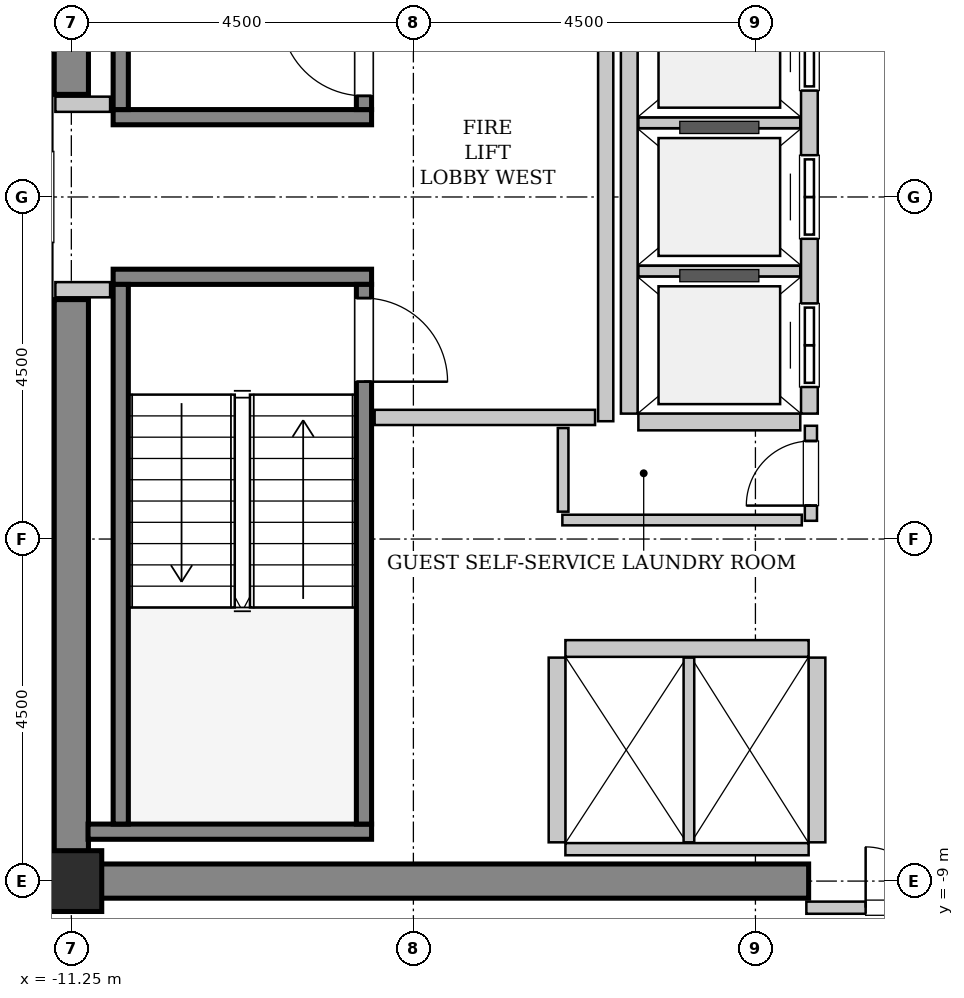
"""IFC4 building model, lengths in metres.
Left out: names, types, materials, properties, quantities, classifications, styles, units other than length and angle.
Written with IfcOpenShell. Run it as: python <this file> out.ifc"""

import sys

from ifc_helpers import new_model, si_unit, direction, frame, frame_2d, origin, origin_2d, place, context, subcontext, project, spatial, rectangle, hollow_rectangle, extrude, source, transform, mapped, element, fill, save


model = new_model("IFC4")
c1 = context("Model", 3, precision=1e-05, world=origin(), true_north=direction((0.0, 1.0)))
c2 = subcontext(c1, "Body", "Model", "MODEL_VIEW")
j1 = project(units=[si_unit("LENGTHUNIT", "METRE"), si_unit("PLANEANGLEUNIT", "RADIAN")], contexts=[c1])
p1 = place(None, origin())
s1 = spatial("IfcSite", under=j1, at=p1, CompositionType="ELEMENT")
p2 = place(p1, origin())
s2 = spatial("IfcBuilding", under=s1, at=p2, CompositionType="ELEMENT")
p3 = place(p2, frame((0.0, 0.0, 264.6)))
s3 = spatial("IfcBuildingStorey", under=s2, at=p3, CompositionType="ELEMENT", Elevation=264.6)
m1 = source(origin(), c2, "Body", "SweptSolid", [
    extrude(rectangle(XDim=9.925, YDim=0.45, at=frame_2d((4.962, 0.0))), origin(), (0.0, 0.0, 1.0), 3.8),
])
p4 = place(p3, frame((-11.475, -9.0, 0.0), z_axis=(0.0, 0.0, 1.0), x_axis=(1.0, 0.0, 0.0)))
e1 = element("IfcWall", 1, at=p4, inside=s3, PredefinedType="SHEAR", context=c2, shape_type="MappedRepresentation", body=[
    mapped(m1, transform((0.0, 0.0, 0.0), x_axis=(1.0, 0.0, 0.0), y_axis=(0.0, 1.0, 0.0), z_axis=(0.0, 0.0, 1.0), scale=1.0)),
])
m2 = source(origin(), c2, "Body", "SweptSolid", [
    extrude(rectangle(XDim=7.425, YDim=0.45, at=frame_2d((3.712, 0.0))), origin(), (0.0, 0.0, 1.0), 3.8),
])
for number, where, z_axis, x_axis in (
    (2, (-11.25, -8.775, 0.0), (0.0, 0.0, 1.0), (0.0, 1.0, 0.0)),
    (3, (-11.25, 1.35, 0.0), (0.0, 0.0, 1.0), (0.0, 1.0, 0.0)),
):
    element("IfcWall", number, at=place(p3, frame(where, z_axis=z_axis, x_axis=x_axis)), inside=s3, PredefinedType="SHEAR", context=c2, shape_type="MappedRepresentation", body=[
        mapped(m2, transform((0.0, 0.0, 0.0), x_axis=(1.0, 0.0, 0.0), y_axis=(0.0, 1.0, 0.0), z_axis=(0.0, 0.0, 1.0), scale=1.0)),
    ])
m3 = source(origin(), c2, "Body", "SweptSolid", [
    extrude(hollow_rectangle(XDim=0.8, YDim=0.8, WallThickness=0.04, InnerFilletRadius=0.04, OuterFilletRadius=0.08, at=origin_2d()), origin(), (0.0, 0.0, 1.0), 3.8),
])
p5 = place(p3, frame((-11.25, -9.0, 0.0), z_axis=(0.0, 0.0, 1.0), x_axis=(1.0, 0.0, 0.0)))
e4 = element("IfcColumn", 4, at=p5, inside=s3, PredefinedType="COLUMN", context=c2, shape_type="MappedRepresentation", body=[
    mapped(m3, transform((0.0, 0.0, 0.0), x_axis=(1.0, 0.0, 0.0), y_axis=(0.0, 1.0, 0.0), z_axis=(0.0, 0.0, 1.0), scale=1.0)),
])
m4 = source(origin(), c2, "Body", "SweptSolid", [
    extrude(rectangle(XDim=3.4, YDim=0.2, at=frame_2d((1.7, 0.0))), origin(), (0.0, 0.0, 1.0), 3.8),
])
p6 = place(p3, frame((-7.3, 1.05, 0.0), z_axis=(0.0, 0.0, 1.0), x_axis=(-1.0, 0.0, 0.0)))
e5 = element("IfcWall", 5, at=p6, inside=s3, PredefinedType="SOLIDWALL", context=c2, shape_type="MappedRepresentation", body=[
    mapped(m4, transform((0.0, 0.0, 0.0), x_axis=(1.0, 0.0, 0.0), y_axis=(0.0, 1.0, 0.0), z_axis=(0.0, 0.0, 1.0), scale=1.0)),
])
m5 = source(origin(), c2, "Body", "SweptSolid", [
    extrude(rectangle(XDim=7.1, YDim=0.2, at=frame_2d((3.55, 0.0))), origin(), (0.0, 0.0, 1.0), 3.8),
])
p7 = place(p3, frame((-7.4, 1.15, 0.0), z_axis=(0.0, 0.0, 1.0), x_axis=(0.0, 1.0, 0.0)))
e6 = element("IfcWall", 6, at=p7, inside=s3, PredefinedType="SOLIDWALL", context=c2, shape_type="MappedRepresentation", body=[
    mapped(m5, transform((0.0, 0.0, 0.0), x_axis=(1.0, 0.0, 0.0), y_axis=(0.0, 1.0, 0.0), z_axis=(0.0, 0.0, 1.0), scale=1.0)),
])
p8 = place(p7, frame((0.18, 0.0, 0.0)))
e7 = element("IfcOpeningElement", 7, at=p8, cuts=e6, PredefinedType="OPENING", context=c2, shape_type="SweptSolid", body=[
    extrude(rectangle(XDim=1.1, YDim=2.15, at=frame_2d((0.55, 1.075))), frame((0.0, 0.11, 0.0), z_axis=(0.0, -1.0, 0.0), x_axis=(1.0, 0.0, 0.0)), (0.0, 0.0, 1.0), 0.22),
])
p9 = place(p3, frame((-10.6, 1.15, 0.0), z_axis=(0.0, 0.0, 1.0), x_axis=(0.0, 1.0, 0.0)))
e8 = element("IfcWall", 8, at=p9, inside=s3, PredefinedType="SOLIDWALL", context=c2, shape_type="MappedRepresentation", body=[
    mapped(m5, transform((0.0, 0.0, 0.0), x_axis=(1.0, 0.0, 0.0), y_axis=(0.0, 1.0, 0.0), z_axis=(0.0, 0.0, 1.0), scale=1.0)),
])
p10 = place(p3, frame((-10.7, -1.05, 0.0), z_axis=(0.0, 0.0, 1.0), x_axis=(1.0, 0.0, 0.0)))
e9 = element("IfcWall", 9, at=p10, inside=s3, PredefinedType="SOLIDWALL", context=c2, shape_type="MappedRepresentation", body=[
    mapped(m4, transform((0.0, 0.0, 0.0), x_axis=(1.0, 0.0, 0.0), y_axis=(0.0, 1.0, 0.0), z_axis=(0.0, 0.0, 1.0), scale=1.0)),
])
m6 = source(origin(), c2, "Body", "SweptSolid", [
    extrude(rectangle(XDim=3.73, YDim=0.2, at=frame_2d((1.865, 0.0))), origin(), (0.0, 0.0, 1.0), 3.8),
])
p11 = place(p3, frame((-11.03, -8.35, 0.0), z_axis=(0.0, 0.0, 1.0), x_axis=(1.0, 0.0, 0.0)))
e10 = element("IfcWall", 10, at=p11, inside=s3, PredefinedType="SOLIDWALL", context=c2, shape_type="MappedRepresentation", body=[
    mapped(m6, transform((0.0, 0.0, 0.0), x_axis=(1.0, 0.0, 0.0), y_axis=(0.0, 1.0, 0.0), z_axis=(0.0, 0.0, 1.0), scale=1.0)),
])
p12 = place(p3, frame((-10.6, -1.15, 0.0), z_axis=(0.0, 0.0, 1.0), x_axis=(0.0, -1.0, 0.0)))
e11 = element("IfcWall", 11, at=p12, inside=s3, PredefinedType="SOLIDWALL", context=c2, shape_type="MappedRepresentation", body=[
    mapped(m5, transform((0.0, 0.0, 0.0), x_axis=(1.0, 0.0, 0.0), y_axis=(0.0, 1.0, 0.0), z_axis=(0.0, 0.0, 1.0), scale=1.0)),
])
p13 = place(p3, frame((-7.4, -1.15, 0.0), z_axis=(0.0, 0.0, 1.0), x_axis=(0.0, -1.0, 0.0)))
e12 = element("IfcWall", 12, at=p13, inside=s3, PredefinedType="SOLIDWALL", context=c2, shape_type="MappedRepresentation", body=[
    mapped(m5, transform((0.0, 0.0, 0.0), x_axis=(1.0, 0.0, 0.0), y_axis=(0.0, 1.0, 0.0), z_axis=(0.0, 0.0, 1.0), scale=1.0)),
])
p14 = place(p13, frame((0.18, 0.0, 0.0)))
e13 = element("IfcOpeningElement", 13, at=p14, cuts=e12, PredefinedType="OPENING", context=c2, shape_type="SweptSolid", body=[
    extrude(rectangle(XDim=1.1, YDim=2.15, at=frame_2d((0.55, 1.075))), frame((0.0, 0.11, 0.0), z_axis=(0.0, -1.0, 0.0), x_axis=(1.0, 0.0, 0.0)), (0.0, 0.0, 1.0), 0.22),
])
m7 = source(origin(), c2, "Body", "SweptSolid", [
    extrude(rectangle(XDim=3.2, YDim=0.22, at=frame_2d((1.6, 0.0))), origin(), (0.0, 0.0, 1.0), 3.535),
])
p15 = place(p3, frame((-1.55, -5.94, 0.0), z_axis=(0.0, 0.0, 1.0), x_axis=(-1.0, 0.0, 0.0)))
e14 = element("IfcWall", 14, at=p15, inside=s3, PredefinedType="SOLIDWALL", context=c2, shape_type="MappedRepresentation", body=[
    mapped(m7, transform((0.0, 0.0, 0.0), x_axis=(1.0, 0.0, 0.0), y_axis=(0.0, 1.0, 0.0), z_axis=(0.0, 0.0, 1.0), scale=1.0)),
])
m8 = source(origin(), c2, "Body", "SweptSolid", [
    extrude(rectangle(XDim=3.2, YDim=0.16, at=frame_2d((1.6, 0.0))), origin(), (0.0, 0.0, 1.0), 2.625),
])
p16 = place(p3, frame((-4.75, -8.58, 0.0), z_axis=(0.0, 0.0, 1.0), x_axis=(1.0, 0.0, 0.0)))
e15 = element("IfcWall", 15, at=p16, inside=s3, PredefinedType="PARTITIONING", context=c2, shape_type="MappedRepresentation", body=[
    mapped(m8, transform((0.0, 0.0, 0.0), x_axis=(1.0, 0.0, 0.0), y_axis=(0.0, 1.0, 0.0), z_axis=(0.0, 0.0, 1.0), scale=1.0)),
])
m9 = source(origin(), c2, "Body", "SweptSolid", [
    extrude(rectangle(XDim=2.43, YDim=0.22, at=frame_2d((1.215, 0.0))), origin(), (0.0, 0.0, 1.0), 3.535),
])
p17 = place(p3, frame((-4.86, -6.06, 0.0), z_axis=(0.0, 0.0, 1.0), x_axis=(0.0, -1.0, 0.0)))
e16 = element("IfcWall", 16, at=p17, inside=s3, PredefinedType="SOLIDWALL", context=c2, shape_type="MappedRepresentation", body=[
    mapped(m9, transform((0.0, 0.0, 0.0), x_axis=(1.0, 0.0, 0.0), y_axis=(0.0, 1.0, 0.0), z_axis=(0.0, 0.0, 1.0), scale=1.0)),
])
m10 = source(origin(), c2, "Body", "SweptSolid", [
    extrude(rectangle(XDim=2.43, YDim=0.14, at=frame_2d((1.215, 0.0))), origin(), (0.0, 0.0, 1.0), 3.535),
])
p18 = place(p3, frame((-3.125, -8.49, 0.0), z_axis=(0.0, 0.0, 1.0), x_axis=(0.0, 1.0, 0.0)))
e17 = element("IfcWall", 17, at=p18, inside=s3, PredefinedType="PARTITIONING", context=c2, shape_type="MappedRepresentation", body=[
    mapped(m10, transform((0.0, 0.0, 0.0), x_axis=(1.0, 0.0, 0.0), y_axis=(0.0, 1.0, 0.0), z_axis=(0.0, 0.0, 1.0), scale=1.0)),
])
p19 = place(p3, frame((-1.44, -8.49, 0.0), z_axis=(0.0, 0.0, 1.0), x_axis=(0.0, 1.0, 0.0)))
e18 = element("IfcWall", 18, at=p19, inside=s3, PredefinedType="SOLIDWALL", context=c2, shape_type="MappedRepresentation", body=[
    mapped(m9, transform((0.0, 0.0, 0.0), x_axis=(1.0, 0.0, 0.0), y_axis=(0.0, 1.0, 0.0), z_axis=(0.0, 0.0, 1.0), scale=1.0)),
])
m11 = source(origin(), c2, "Body", "SweptSolid", [
    extrude(rectangle(XDim=5.7, YDim=0.22, at=frame_2d((2.85, 0.0))), origin(), (0.0, 0.0, 1.0), 3.535),
])
p20 = place(p3, frame((-1.54, -2.85, 0.0), z_axis=(0.0, 0.0, 1.0), x_axis=(0.0, 1.0, 0.0)))
e19 = element("IfcWall", 19, at=p20, inside=s3, PredefinedType="SOLIDWALL", context=c2, shape_type="MappedRepresentation", body=[
    mapped(m11, transform((0.0, 0.0, 0.0), x_axis=(1.0, 0.0, 0.0), y_axis=(0.0, 1.0, 0.0), z_axis=(0.0, 0.0, 1.0), scale=1.0)),
])
p21 = place(p20, frame((0.35, 0.0, 0.0)))
e20 = element("IfcOpeningElement", 20, at=p21, cuts=e19, PredefinedType="OPENING", context=c2, shape_type="SweptSolid", body=[
    extrude(rectangle(XDim=1.1, YDim=2.2, at=frame_2d((0.55, 1.1))), frame((0.0, 0.12, 0.0), z_axis=(0.0, -1.0, 0.0), x_axis=(1.0, 0.0, 0.0)), (0.0, 0.0, 1.0), 0.24),
])
p22 = place(p20, frame((2.3, 0.0, 0.0)))
e21 = element("IfcOpeningElement", 21, at=p22, cuts=e19, PredefinedType="OPENING", context=c2, shape_type="SweptSolid", body=[
    extrude(rectangle(XDim=1.1, YDim=2.2, at=frame_2d((0.55, 1.1))), frame((0.0, 0.12, 0.0), z_axis=(0.0, -1.0, 0.0), x_axis=(1.0, 0.0, 0.0)), (0.0, 0.0, 1.0), 0.24),
])
p23 = place(p20, frame((4.25, 0.0, 0.0)))
e22 = element("IfcOpeningElement", 22, at=p23, cuts=e19, PredefinedType="OPENING", context=c2, shape_type="SweptSolid", body=[
    extrude(rectangle(XDim=1.1, YDim=2.2, at=frame_2d((0.55, 1.1))), frame((0.0, 0.12, 0.0), z_axis=(0.0, -1.0, 0.0), x_axis=(1.0, 0.0, 0.0)), (0.0, 0.0, 1.0), 0.24),
])
p24 = place(p3, frame((-3.91, 2.85, 0.0), z_axis=(0.0, 0.0, 1.0), x_axis=(0.0, -1.0, 0.0)))
e23 = element("IfcWall", 23, at=p24, inside=s3, PredefinedType="SOLIDWALL", context=c2, shape_type="MappedRepresentation", body=[
    mapped(m11, transform((0.0, 0.0, 0.0), x_axis=(1.0, 0.0, 0.0), y_axis=(0.0, 1.0, 0.0), z_axis=(0.0, 0.0, 1.0), scale=1.0)),
])
m12 = source(origin(), c2, "Body", "SweptSolid", [
    extrude(rectangle(XDim=2.13, YDim=0.22, at=frame_2d((1.065, 0.0))), origin(), (0.0, 0.0, 1.0), 3.535),
])
p25 = place(p3, frame((-3.79, -2.96, 0.0), z_axis=(0.0, 0.0, 1.0), x_axis=(1.0, 0.0, 0.0)))
e24 = element("IfcWall", 24, at=p25, inside=s3, PredefinedType="SOLIDWALL", context=c2, shape_type="MappedRepresentation", body=[
    mapped(m12, transform((0.0, 0.0, 0.0), x_axis=(1.0, 0.0, 0.0), y_axis=(0.0, 1.0, 0.0), z_axis=(0.0, 0.0, 1.0), scale=1.0)),
])
m13 = source(origin(), c2, "Body", "SweptSolid", [
    extrude(rectangle(XDim=2.13, YDim=0.14, at=frame_2d((1.065, 0.0))), origin(), (0.0, 0.0, 1.0), 3.535),
])
for number, where, z_axis, x_axis in (
    (25, (-3.79, -0.975, 0.0), (0.0, 0.0, 1.0), (1.0, 0.0, 0.0)),
    (26, (-3.79, 0.975, 0.0), (0.0, 0.0, 1.0), (1.0, 0.0, 0.0)),
):
    element("IfcWall", number, at=place(p3, frame(where, z_axis=z_axis, x_axis=x_axis)), inside=s3, PredefinedType="PARTITIONING", context=c2, shape_type="MappedRepresentation", body=[
        mapped(m13, transform((0.0, 0.0, 0.0), x_axis=(1.0, 0.0, 0.0), y_axis=(0.0, 1.0, 0.0), z_axis=(0.0, 0.0, 1.0), scale=1.0)),
    ])
m14 = source(origin(), c2, "Body", "SweptSolid", [
    extrude(rectangle(XDim=5.9, YDim=0.2, at=frame_2d((2.95, 0.0))), origin(), (0.0, 0.0, 1.0), 3.535),
])
p26 = place(p3, frame((-4.22, -2.95, 0.0), z_axis=(0.0, 0.0, 1.0), x_axis=(0.0, 1.0, 0.0)))
e27 = element("IfcWall", 27, at=p26, inside=s3, PredefinedType="PARTITIONING", context=c2, shape_type="MappedRepresentation", body=[
    mapped(m14, transform((0.0, 0.0, 0.0), x_axis=(1.0, 0.0, 0.0), y_axis=(0.0, 1.0, 0.0), z_axis=(0.0, 0.0, 1.0), scale=1.0)),
])
m15 = source(origin(), c2, "Body", "SweptSolid", [
    extrude(rectangle(XDim=2.9, YDim=0.2, at=frame_2d((1.45, 0.0))), origin(), (0.0, 0.0, 1.0), 3.535),
])
p27 = place(p3, frame((-7.26, -2.9, 0.0), z_axis=(0.0, 0.0, 1.0), x_axis=(1.0, 0.0, 0.0)))
e28 = element("IfcWall", 28, at=p27, inside=s3, PredefinedType="PARTITIONING", context=c2, shape_type="MappedRepresentation", body=[
    mapped(m15, transform((0.0, 0.0, 0.0), x_axis=(1.0, 0.0, 0.0), y_axis=(0.0, 1.0, 0.0), z_axis=(0.0, 0.0, 1.0), scale=1.0)),
])
m16 = source(origin(), c2, "Body", "SweptSolid", [
    extrude(rectangle(XDim=0.72, YDim=0.2, at=frame_2d((0.36, 0.0))), origin(), (0.0, 0.0, 1.0), 3.535),
])
for number, where, z_axis, x_axis in (
    (29, (-11.46, 1.22, 0.0), (0.0, 0.0, 1.0), (1.0, 0.0, 0.0)),
    (30, (-11.46, -1.22, 0.0), (0.0, 0.0, 1.0), (1.0, 0.0, 0.0)),
):
    element("IfcWall", number, at=place(p3, frame(where, z_axis=z_axis, x_axis=x_axis)), inside=s3, PredefinedType="PARTITIONING", context=c2, shape_type="MappedRepresentation", body=[
        mapped(m16, transform((0.0, 0.0, 0.0), x_axis=(1.0, 0.0, 0.0), y_axis=(0.0, 1.0, 0.0), z_axis=(0.0, 0.0, 1.0), scale=1.0)),
    ])
m17 = source(origin(), c2, "Body", "SweptSolid", [
    extrude(rectangle(XDim=3.16, YDim=0.16, at=frame_2d((1.58, 0.0))), origin(), (0.0, 0.0, 1.0), 2.625),
])
p28 = place(p3, frame((-1.58, -9.35, 0.0), z_axis=(0.0, 0.0, 1.0), x_axis=(1.0, 0.0, 0.0)))
e31 = element("IfcWall", 31, at=p28, inside=s3, PredefinedType="PARTITIONING", context=c2, shape_type="MappedRepresentation", body=[
    mapped(m17, transform((0.0, 0.0, 0.0), x_axis=(1.0, 0.0, 0.0), y_axis=(0.0, 1.0, 0.0), z_axis=(0.0, 0.0, 1.0), scale=1.0)),
])
p29 = place(p28, frame((0.78, 0.0, 0.0)))
e32 = element("IfcOpeningElement", 32, at=p29, cuts=e31, PredefinedType="OPENING", context=c2, shape_type="SweptSolid", body=[
    extrude(rectangle(XDim=1.6, YDim=2.3, at=frame_2d((0.8, 1.15))), frame((0.0, 0.09, 0.0), z_axis=(0.0, -1.0, 0.0), x_axis=(1.0, 0.0, 0.0)), (0.0, 0.0, 1.0), 0.18),
])
m18 = source(origin(), c2, "Body", "SweptSolid", [
    extrude(rectangle(XDim=1.25, YDim=0.16, at=frame_2d((0.625, 0.0))), origin(), (0.0, 0.0, 1.0), 3.535),
])
p30 = place(p3, frame((-1.52, -4.26, 0.0), z_axis=(0.0, 0.0, 1.0), x_axis=(0.0, 1.0, 0.0)))
e33 = element("IfcWall", 33, at=p30, inside=s3, PredefinedType="PARTITIONING", context=c2, shape_type="MappedRepresentation", body=[
    mapped(m18, transform((0.0, 0.0, 0.0), x_axis=(1.0, 0.0, 0.0), y_axis=(0.0, 1.0, 0.0), z_axis=(0.0, 0.0, 1.0), scale=1.0)),
])
p31 = place(p30, frame((0.2, 0.0, 0.0)))
e34 = element("IfcOpeningElement", 34, at=p31, cuts=e33, PredefinedType="OPENING", context=c2, shape_type="SweptSolid", body=[
    extrude(rectangle(XDim=0.85, YDim=2.1, at=frame_2d((0.425, 1.05))), frame((0.0, 0.09, 0.0), z_axis=(0.0, -1.0, 0.0), x_axis=(1.0, 0.0, 0.0)), (0.0, 0.0, 1.0), 0.18),
])
m19 = source(origin(), c2, "Body", "SweptSolid", [
    extrude(rectangle(XDim=3.15, YDim=0.14, at=frame_2d((1.575, 0.0))), origin(), (0.0, 0.0, 1.0), 3.535),
])
p32 = place(p3, frame((-4.79, -4.25, 0.0), z_axis=(0.0, 0.0, 1.0), x_axis=(1.0, 0.0, 0.0)))
e35 = element("IfcWall", 35, at=p32, inside=s3, PredefinedType="PARTITIONING", context=c2, shape_type="MappedRepresentation", body=[
    mapped(m19, transform((0.0, 0.0, 0.0), x_axis=(1.0, 0.0, 0.0), y_axis=(0.0, 1.0, 0.0), z_axis=(0.0, 0.0, 1.0), scale=1.0)),
])
m20 = source(origin(), c2, "Body", "SweptSolid", [
    extrude(rectangle(XDim=1.1, YDim=0.14, at=frame_2d((0.55, 0.0))), origin(), (0.0, 0.0, 1.0), 3.535),
])
p33 = place(p3, frame((-4.78, -4.14, 0.0), z_axis=(0.0, 0.0, 1.0), x_axis=(0.0, 1.0, 0.0)))
e36 = element("IfcWall", 36, at=p33, inside=s3, PredefinedType="PARTITIONING", context=c2, shape_type="MappedRepresentation", body=[
    mapped(m20, transform((0.0, 0.0, 0.0), x_axis=(1.0, 0.0, 0.0), y_axis=(0.0, 1.0, 0.0), z_axis=(0.0, 0.0, 1.0), scale=1.0)),
])
m21 = source(origin(), c2, "Body", "SweptSolid", [
    extrude(rectangle(XDim=1.1, YDim=2.15, at=frame_2d((0.55, 1.075))), frame((0.0, 0.025, 0.0), z_axis=(0.0, -1.0, 0.0), x_axis=(1.0, 0.0, 0.0)), (0.0, 0.0, 1.0), 0.05),
])
p34 = place(p8, origin())
e37 = element("IfcDoor", 37, at=p34, inside=s3, OperationType="SINGLE_SWING_RIGHT", PredefinedType="DOOR", context=c2, shape_type="MappedRepresentation", body=[
    mapped(m21, transform((0.0, 0.0, 0.0), x_axis=(1.0, 0.0, 0.0), y_axis=(0.0, 1.0, 0.0), z_axis=(0.0, 0.0, 1.0), scale=1.0)),
])
fill(e7, e37)
p35 = place(p14, origin())
e38 = element("IfcDoor", 38, at=p35, inside=s3, OperationType="SINGLE_SWING_RIGHT", PredefinedType="DOOR", context=c2, shape_type="MappedRepresentation", body=[
    mapped(m21, transform((0.0, 0.0, 0.0), x_axis=(1.0, 0.0, 0.0), y_axis=(0.0, 1.0, 0.0), z_axis=(0.0, 0.0, 1.0), scale=1.0)),
])
fill(e13, e38)
m22 = source(origin(), c2, "Body", "SweptSolid", [
    extrude(rectangle(XDim=1.1, YDim=2.2, at=frame_2d((0.55, 1.1))), frame((0.0, 0.025, 0.0), z_axis=(0.0, -1.0, 0.0), x_axis=(1.0, 0.0, 0.0)), (0.0, 0.0, 1.0), 0.05),
])
p36 = place(p21, origin())
e39 = element("IfcDoor", 39, at=p36, inside=s3, OperationType="DOUBLE_DOOR_SLIDING", PredefinedType="DOOR", context=c2, shape_type="MappedRepresentation", body=[
    mapped(m22, transform((0.0, 0.0, 0.0), x_axis=(1.0, 0.0, 0.0), y_axis=(0.0, 1.0, 0.0), z_axis=(0.0, 0.0, 1.0), scale=1.0)),
])
fill(e20, e39)
p37 = place(p22, origin())
e40 = element("IfcDoor", 40, at=p37, inside=s3, OperationType="DOUBLE_DOOR_SLIDING", PredefinedType="DOOR", context=c2, shape_type="MappedRepresentation", body=[
    mapped(m22, transform((0.0, 0.0, 0.0), x_axis=(1.0, 0.0, 0.0), y_axis=(0.0, 1.0, 0.0), z_axis=(0.0, 0.0, 1.0), scale=1.0)),
])
fill(e21, e40)
p38 = place(p23, origin())
e41 = element("IfcDoor", 41, at=p38, inside=s3, OperationType="DOUBLE_DOOR_SLIDING", PredefinedType="DOOR", context=c2, shape_type="MappedRepresentation", body=[
    mapped(m22, transform((0.0, 0.0, 0.0), x_axis=(1.0, 0.0, 0.0), y_axis=(0.0, 1.0, 0.0), z_axis=(0.0, 0.0, 1.0), scale=1.0)),
])
fill(e22, e41)
m23 = source(origin(), c2, "Body", "SweptSolid", [
    extrude(rectangle(XDim=1.6, YDim=2.3, at=frame_2d((0.8, 1.15))), frame((0.0, 0.025, 0.0), z_axis=(0.0, -1.0, 0.0), x_axis=(1.0, 0.0, 0.0)), (0.0, 0.0, 1.0), 0.05),
])
p39 = place(p29, origin())
e42 = element("IfcDoor", 42, at=p39, inside=s3, OperationType="DOUBLE_DOOR_SINGLE_SWING", PredefinedType="DOOR", context=c2, shape_type="MappedRepresentation", body=[
    mapped(m23, transform((0.0, 0.0, 0.0), x_axis=(1.0, 0.0, 0.0), y_axis=(0.0, 1.0, 0.0), z_axis=(0.0, 0.0, 1.0), scale=1.0)),
])
fill(e32, e42)
m24 = source(origin(), c2, "Body", "SweptSolid", [
    extrude(rectangle(XDim=0.85, YDim=2.1, at=frame_2d((0.425, 1.05))), frame((0.0, 0.025, 0.0), z_axis=(0.0, -1.0, 0.0), x_axis=(1.0, 0.0, 0.0)), (0.0, 0.0, 1.0), 0.05),
])
p40 = place(p31, origin())
e43 = element("IfcDoor", 43, at=p40, inside=s3, OperationType="SINGLE_SWING_LEFT", PredefinedType="DOOR", context=c2, shape_type="MappedRepresentation", body=[
    mapped(m24, transform((0.0, 0.0, 0.0), x_axis=(1.0, 0.0, 0.0), y_axis=(0.0, 1.0, 0.0), z_axis=(0.0, 0.0, 1.0), scale=1.0)),
])
fill(e34, e43)
save(model, sys.argv[1])
